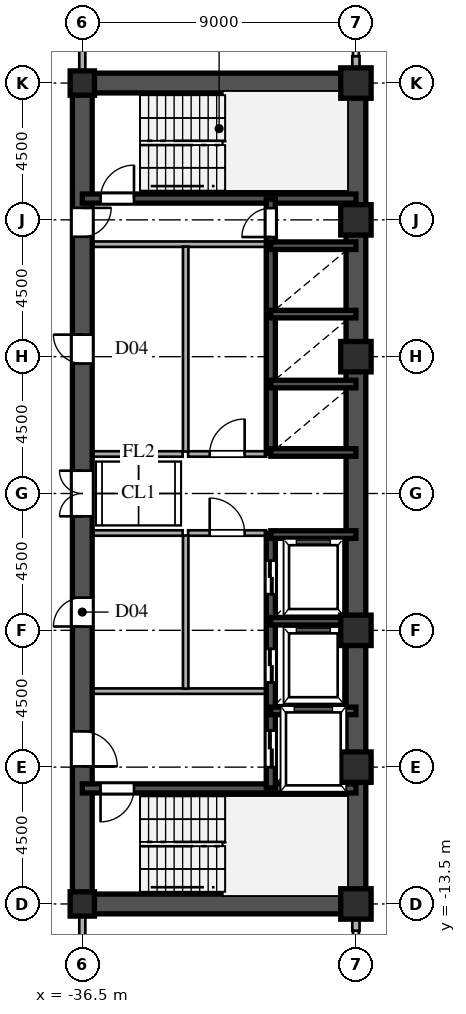
"""IFC4 building model, lengths in metres.
Left out: names, types, materials, properties, quantities, classifications, styles, units other than length and angle.
Written with IfcOpenShell. Run it as: python <this file> out.ifc"""

import sys

from ifc_helpers import new_model, si_unit, direction, frame, frame_2d, origin, origin_2d, place, context, subcontext, project, spatial, rectangle, hollow_rectangle, i_section, extrude, source, transform, mapped, element, fill, save


model = new_model("IFC4")
c1 = context("Model", 3, precision=1e-05, world=origin(), true_north=direction((0.0, 1.0)))
c2 = subcontext(c1, "Body", "Model", "MODEL_VIEW")
j1 = project(units=[si_unit("LENGTHUNIT", "METRE"), si_unit("PLANEANGLEUNIT", "RADIAN")], contexts=[c1])
p1 = place(None, origin())
s1 = spatial("IfcSite", under=j1, at=p1, CompositionType="ELEMENT")
p2 = place(p1, origin())
s2 = spatial("IfcBuilding", under=s1, at=p2, CompositionType="ELEMENT")
p3 = place(p2, frame((0.0, 0.0, 62.1)))
s3 = spatial("IfcBuildingStorey", under=s2, at=p3, CompositionType="ELEMENT", Elevation=62.1)
m1 = source(origin(), c2, "Body", "SweptSolid", [
    extrude(hollow_rectangle(XDim=1.0, YDim=1.0, WallThickness=0.042, at=origin_2d()), origin(), (0.0, 0.0, 1.0), 3.6),
])
for number, where, z_axis, x_axis in (
    (1, (-27.5, -13.5, 0.0), (0.0, 0.0, 1.0), (1.0, 0.0, 0.0)),
    (2, (-27.5, -9.0, 0.0), (0.0, 0.0, 1.0), (1.0, 0.0, 0.0)),
    (3, (-27.5, -4.5, 0.0), (0.0, 0.0, 1.0), (1.0, 0.0, 0.0)),
    (4, (-27.5, 4.5, 0.0), (0.0, 0.0, 1.0), (1.0, 0.0, 0.0)),
    (5, (-27.5, 9.0, 0.0), (0.0, 0.0, 1.0), (1.0, 0.0, 0.0)),
    (6, (-27.5, 13.5, 0.0), (0.0, 0.0, 1.0), (1.0, 0.0, 0.0)),
):
    element("IfcColumn", number, at=place(p3, frame(where, z_axis=z_axis, x_axis=x_axis)), inside=s3, PredefinedType="COLUMN", context=c2, shape_type="MappedRepresentation", body=[
        mapped(m1, transform((0.0, 0.0, 0.0), scale=1.0)),
    ])
m2 = source(origin(), c2, "Body", "SweptSolid", [
    extrude(i_section(OverallWidth=0.8, OverallDepth=0.8, WebThickness=0.032, FlangeThickness=0.05, at=origin_2d()), origin(), (0.0, 0.0, 1.0), 3.6),
])
for number, where, z_axis, x_axis in (
    (7, (-36.5, -13.5, 0.0), (0.0, 0.0, 1.0), (1.0, 0.0, 0.0)),
    (8, (-36.5, 13.5, 0.0), (0.0, 0.0, 1.0), (1.0, 0.0, 0.0)),
):
    element("IfcColumn", number, at=place(p3, frame(where, z_axis=z_axis, x_axis=x_axis)), inside=s3, PredefinedType="COLUMN", context=c2, shape_type="MappedRepresentation", body=[
        mapped(m2, transform((0.0, 0.0, 0.0), scale=1.0)),
    ])
for number, where, z_axis, x_axis in (
    (9, (-27.5, -14.38, 0.0), (0.0, 0.0, 1.0), (0.0, 1.0, 0.0)),
    (10, (-27.5, 13.83, 0.0), (0.0, 0.0, 1.0), (0.0, 1.0, 0.0)),
):
    element("IfcWall", number, at=place(p3, frame(where, z_axis=z_axis, x_axis=x_axis)), inside=s3, PredefinedType="SOLIDWALL", context=c2, shape_type="SweptSolid", body=[
        extrude(rectangle(XDim=0.55, YDim=0.24, at=frame_2d((0.275, 0.0))), origin(), (0.0, 0.0, 1.0), 2.88),
    ])
for number, where, z_axis, x_axis in (
    (11, (-27.5, -13.5, 0.0), (0.0, 0.0, 1.0), (0.0, 1.0, 0.0)),
    (12, (-27.5, 1.3, 0.0), (0.0, 0.0, 1.0), (0.0, 1.0, 0.0)),
):
    element("IfcWall", number, at=place(p3, frame(where, z_axis=z_axis, x_axis=x_axis)), inside=s3, PredefinedType="SHEAR", context=c2, shape_type="SweptSolid", body=[
        extrude(rectangle(XDim=12.2, YDim=0.65, at=frame_2d((6.1, 0.0))), origin(), (0.0, 0.0, 1.0), 3.38),
    ])
p4 = place(p3, frame((-27.5, -1.3, 0.0), z_axis=(0.0, 0.0, 1.0), x_axis=(0.0, 1.0, 0.0)))
e13 = element("IfcWall", 13, at=p4, inside=s3, PredefinedType="SHEAR", context=c2, shape_type="SweptSolid", body=[
    extrude(rectangle(XDim=2.6, YDim=0.65, at=frame_2d((1.3, 0.0))), origin(), (0.0, 0.0, 1.0), 3.38),
])
for number, where, z_axis, x_axis in (
    (14, (-36.5, -13.5, 0.0), (0.0, 0.0, 1.0), (1.0, 0.0, 0.0)),
    (15, (-36.5, 13.5, 0.0), (0.0, 0.0, 1.0), (1.0, 0.0, 0.0)),
):
    element("IfcWall", number, at=place(p3, frame(where, z_axis=z_axis, x_axis=x_axis)), inside=s3, PredefinedType="SHEAR", context=c2, shape_type="SweptSolid", body=[
        extrude(rectangle(XDim=9.0, YDim=0.65, at=frame_2d((4.5, 0.0))), origin(), (0.0, 0.0, 1.0), 3.38),
    ])
p5 = place(p3, frame((-36.5, -13.65, 0.0), z_axis=(0.0, 0.0, 1.0), x_axis=(0.0, 1.0, 0.0)))
e16 = element("IfcWall", 16, at=p5, inside=s3, PredefinedType="SHEAR", context=c2, shape_type="SweptSolid", body=[
    extrude(rectangle(XDim=7.15, YDim=0.65, at=frame_2d((3.575, 0.0))), origin(), (0.0, 0.0, 1.0), 3.38),
])
p6 = place(p5, frame((4.675, 0.0, 0.0)))
e17 = element("IfcOpeningElement", 17, at=p6, cuts=e16, PredefinedType="OPENING", context=c2, shape_type="SweptSolid", body=[
    extrude(rectangle(XDim=1.15, YDim=2.2, at=frame_2d((0.575, 1.1))), frame((0.0, 0.335, 0.0), z_axis=(0.0, -1.0, 0.0), x_axis=(1.0, 0.0, 0.0)), (0.0, 0.0, 1.0), 0.67),
])
p7 = place(p3, frame((-36.5, -1.3, 0.0), z_axis=(0.0, 0.0, 1.0), x_axis=(0.0, 1.0, 0.0)))
e18 = element("IfcWall", 18, at=p7, inside=s3, PredefinedType="SHEAR", context=c2, shape_type="SweptSolid", body=[
    extrude(rectangle(XDim=2.6, YDim=0.65, at=frame_2d((1.3, 0.0))), origin(), (0.0, 0.0, 1.0), 3.38),
])
p8 = place(p7, frame((0.55, 0.0, 0.0)))
e19 = element("IfcOpeningElement", 19, at=p8, cuts=e18, PredefinedType="OPENING", context=c2, shape_type="SweptSolid", body=[
    extrude(rectangle(XDim=1.5, YDim=2.3, at=frame_2d((0.75, 1.15))), frame((0.0, 0.335, 0.0), z_axis=(0.0, -1.0, 0.0), x_axis=(1.0, 0.0, 0.0)), (0.0, 0.0, 1.0), 0.67),
])
p9 = place(p3, frame((-36.5, 8.2, 0.0), z_axis=(0.0, 0.0, 1.0), x_axis=(0.0, 1.0, 0.0)))
e20 = element("IfcWall", 20, at=p9, inside=s3, PredefinedType="SHEAR", context=c2, shape_type="SweptSolid", body=[
    extrude(rectangle(XDim=5.45, YDim=0.65, at=frame_2d((2.725, 0.0))), origin(), (0.0, 0.0, 1.0), 3.38),
])
p10 = place(p9, frame((0.245, 0.0, 0.0)))
e21 = element("IfcOpeningElement", 21, at=p10, cuts=e20, PredefinedType="OPENING", context=c2, shape_type="SweptSolid", body=[
    extrude(rectangle(XDim=0.95, YDim=2.15, at=frame_2d((0.475, 1.075))), frame((0.0, 0.335, 0.0), z_axis=(0.0, -1.0, 0.0), x_axis=(1.0, 0.0, 0.0)), (0.0, 0.0, 1.0), 0.67),
])
p11 = place(p3, frame((-36.5, -6.5, 0.0), z_axis=(0.0, 0.0, 1.0), x_axis=(0.0, 1.0, 0.0)))
e22 = element("IfcWall", 22, at=p11, inside=s3, PredefinedType="SHEAR", context=c2, shape_type="SweptSolid", body=[
    extrude(rectangle(XDim=5.2, YDim=0.65, at=frame_2d((2.6, 0.0))), origin(), (0.0, 0.0, 1.0), 3.38),
])
p12 = place(p11, frame((2.125, 0.0, 0.0)))
e23 = element("IfcOpeningElement", 23, at=p12, cuts=e22, PredefinedType="OPENING", context=c2, shape_type="SweptSolid", body=[
    extrude(rectangle(XDim=0.95, YDim=2.15, at=frame_2d((0.475, 1.075))), frame((0.0, 0.335, 0.0), z_axis=(0.0, -1.0, 0.0), x_axis=(1.0, 0.0, 0.0)), (0.0, 0.0, 1.0), 0.67),
])
p13 = place(p3, frame((-36.5, 1.3, 0.0), z_axis=(0.0, 0.0, 1.0), x_axis=(0.0, 1.0, 0.0)))
e24 = element("IfcWall", 24, at=p13, inside=s3, PredefinedType="SHEAR", context=c2, shape_type="SweptSolid", body=[
    extrude(rectangle(XDim=6.9, YDim=0.65, at=frame_2d((3.45, 0.0))), origin(), (0.0, 0.0, 1.0), 3.38),
])
p14 = place(p13, frame((2.975, 0.0, 0.0)))
e25 = element("IfcOpeningElement", 25, at=p14, cuts=e24, PredefinedType="OPENING", context=c2, shape_type="SweptSolid", body=[
    extrude(rectangle(XDim=0.95, YDim=2.15, at=frame_2d((0.475, 1.075))), frame((0.0, 0.335, 0.0), z_axis=(0.0, -1.0, 0.0), x_axis=(1.0, 0.0, 0.0)), (0.0, 0.0, 1.0), 0.67),
])
p15 = place(p3, frame((-36.5, -9.7, 0.0), z_axis=(0.0, 0.0, 1.0), x_axis=(1.0, 0.0, 0.0)))
e26 = element("IfcWall", 26, at=p15, inside=s3, PredefinedType="SHEAR", context=c2, shape_type="SweptSolid", body=[
    extrude(rectangle(XDim=9.0, YDim=0.3, at=frame_2d((4.5, 0.0))), origin(), (0.0, 0.0, 1.0), 3.38),
])
p16 = place(p15, frame((0.6, 0.0, 0.0)))
e27 = element("IfcOpeningElement", 27, at=p16, cuts=e26, PredefinedType="OPENING", context=c2, shape_type="SweptSolid", body=[
    extrude(rectangle(XDim=1.1, YDim=2.2, at=frame_2d((0.55, 1.1))), frame((0.0, 0.16, 0.0), z_axis=(0.0, -1.0, 0.0), x_axis=(1.0, 0.0, 0.0)), (0.0, 0.0, 1.0), 0.32),
])
p17 = place(p3, frame((-36.5, 9.7, 0.0), z_axis=(0.0, 0.0, 1.0), x_axis=(1.0, 0.0, 0.0)))
e28 = element("IfcWall", 28, at=p17, inside=s3, PredefinedType="SHEAR", context=c2, shape_type="SweptSolid", body=[
    extrude(rectangle(XDim=9.0, YDim=0.3, at=frame_2d((4.5, 0.0))), origin(), (0.0, 0.0, 1.0), 3.38),
])
p18 = place(p17, frame((0.6, 0.0, 0.0)))
e29 = element("IfcOpeningElement", 29, at=p18, cuts=e28, PredefinedType="OPENING", context=c2, shape_type="SweptSolid", body=[
    extrude(rectangle(XDim=1.1, YDim=2.2, at=frame_2d((0.55, 1.1))), frame((0.0, 0.16, 0.0), z_axis=(0.0, -1.0, 0.0), x_axis=(1.0, 0.0, 0.0)), (0.0, 0.0, 1.0), 0.32),
])
for number, where, z_axis, x_axis in (
    (30, (-30.3, -7.15, 0.0), (0.0, 0.0, 1.0), (1.0, 0.0, 0.0)),
    (31, (-30.3, -4.2, 0.0), (0.0, 0.0, 1.0), (1.0, 0.0, 0.0)),
    (32, (-30.3, -1.35, 0.0), (0.0, 0.0, 1.0), (1.0, 0.0, 0.0)),
    (33, (-30.3, 1.35, 0.0), (0.0, 0.0, 1.0), (1.0, 0.0, 0.0)),
    (34, (-30.3, 3.6, 0.0), (0.0, 0.0, 1.0), (1.0, 0.0, 0.0)),
    (35, (-30.3, 5.9, 0.0), (0.0, 0.0, 1.0), (1.0, 0.0, 0.0)),
    (36, (-30.3, 8.15, 0.0), (0.0, 0.0, 1.0), (1.0, 0.0, 0.0)),
):
    element("IfcWall", number, at=place(p3, frame(where, z_axis=z_axis, x_axis=x_axis)), inside=s3, PredefinedType="SHEAR", context=c2, shape_type="SweptSolid", body=[
        extrude(rectangle(XDim=2.8, YDim=0.25, at=frame_2d((1.4, 0.0))), origin(), (0.0, 0.0, 1.0), 3.38),
    ])
p19 = place(p3, frame((-30.3, -9.68, 0.0), z_axis=(0.0, 0.0, 1.0), x_axis=(0.0, 1.0, 0.0)))
e37 = element("IfcWall", 37, at=p19, inside=s3, PredefinedType="SHEAR", context=c2, shape_type="SweptSolid", body=[
    extrude(rectangle(XDim=2.56, YDim=0.3, at=frame_2d((1.28, 0.0))), origin(), (0.0, 0.0, 1.0), 3.38),
])
p20 = place(p19, frame((0.68, 0.0, 0.0)))
e38 = element("IfcOpeningElement", 38, at=p20, cuts=e37, PredefinedType="OPENING", context=c2, shape_type="SweptSolid", body=[
    extrude(rectangle(XDim=1.2, YDim=2.25, at=frame_2d((0.6, 1.125))), frame((0.0, 0.16, 0.0), z_axis=(0.0, -1.0, 0.0), x_axis=(1.0, 0.0, 0.0)), (0.0, 0.0, 1.0), 0.32),
])
p21 = place(p3, frame((-30.3, -7.12, 0.0), z_axis=(0.0, 0.0, 1.0), x_axis=(0.0, 1.0, 0.0)))
e39 = element("IfcWall", 39, at=p21, inside=s3, PredefinedType="SHEAR", context=c2, shape_type="SweptSolid", body=[
    extrude(rectangle(XDim=2.92, YDim=0.3, at=frame_2d((1.46, 0.0))), origin(), (0.0, 0.0, 1.0), 3.38),
])
p22 = place(p21, frame((0.91, 0.0, 0.0)))
e40 = element("IfcOpeningElement", 40, at=p22, cuts=e39, PredefinedType="OPENING", context=c2, shape_type="SweptSolid", body=[
    extrude(rectangle(XDim=1.1, YDim=2.2, at=frame_2d((0.55, 1.1))), frame((0.0, 0.16, 0.0), z_axis=(0.0, -1.0, 0.0), x_axis=(1.0, 0.0, 0.0)), (0.0, 0.0, 1.0), 0.32),
])
p23 = place(p3, frame((-30.3, -4.2, 0.0), z_axis=(0.0, 0.0, 1.0), x_axis=(0.0, 1.0, 0.0)))
e41 = element("IfcWall", 41, at=p23, inside=s3, PredefinedType="SHEAR", context=c2, shape_type="SweptSolid", body=[
    extrude(rectangle(XDim=2.88, YDim=0.3, at=frame_2d((1.44, 0.0))), origin(), (0.0, 0.0, 1.0), 3.38),
])
p24 = place(p23, frame((0.89, 0.0, 0.0)))
e42 = element("IfcOpeningElement", 42, at=p24, cuts=e41, PredefinedType="OPENING", context=c2, shape_type="SweptSolid", body=[
    extrude(rectangle(XDim=1.1, YDim=2.2, at=frame_2d((0.55, 1.1))), frame((0.0, 0.16, 0.0), z_axis=(0.0, -1.0, 0.0), x_axis=(1.0, 0.0, 0.0)), (0.0, 0.0, 1.0), 0.32),
])
p25 = place(p3, frame((-30.3, 1.32, 0.0), z_axis=(0.0, 0.0, 1.0), x_axis=(0.0, 1.0, 0.0)))
e43 = element("IfcWall", 43, at=p25, inside=s3, PredefinedType="SHEAR", context=c2, shape_type="SweptSolid", body=[
    extrude(rectangle(XDim=2.28, YDim=0.3, at=frame_2d((1.14, 0.0))), origin(), (0.0, 0.0, 1.0), 3.38),
])
p26 = place(p3, frame((-30.3, 3.6, 0.0), z_axis=(0.0, 0.0, 1.0), x_axis=(0.0, 1.0, 0.0)))
e44 = element("IfcWall", 44, at=p26, inside=s3, PredefinedType="SHEAR", context=c2, shape_type="SweptSolid", body=[
    extrude(rectangle(XDim=2.3, YDim=0.3, at=frame_2d((1.15, 0.0))), origin(), (0.0, 0.0, 1.0), 3.38),
])
p27 = place(p3, frame((-30.3, 5.9, 0.0), z_axis=(0.0, 0.0, 1.0), x_axis=(0.0, 1.0, 0.0)))
e45 = element("IfcWall", 45, at=p27, inside=s3, PredefinedType="SHEAR", context=c2, shape_type="SweptSolid", body=[
    extrude(rectangle(XDim=2.25, YDim=0.3, at=frame_2d((1.125, 0.0))), origin(), (0.0, 0.0, 1.0), 3.38),
])
p28 = place(p3, frame((-30.3, 8.15, 0.0), z_axis=(0.0, 0.0, 1.0), x_axis=(0.0, 1.0, 0.0)))
e46 = element("IfcWall", 46, at=p28, inside=s3, PredefinedType="SHEAR", context=c2, shape_type="SweptSolid", body=[
    extrude(rectangle(XDim=1.53, YDim=0.3, at=frame_2d((0.765, 0.0))), origin(), (0.0, 0.0, 1.0), 3.38),
])
p29 = place(p28, frame((0.285, 0.0, 0.0)))
e47 = element("IfcOpeningElement", 47, at=p29, cuts=e46, PredefinedType="OPENING", context=c2, shape_type="SweptSolid", body=[
    extrude(rectangle(XDim=0.95, YDim=2.15, at=frame_2d((0.475, 1.075))), frame((0.0, 0.16, 0.0), z_axis=(0.0, -1.0, 0.0), x_axis=(1.0, 0.0, 0.0)), (0.0, 0.0, 1.0), 0.32),
])
for number, where, z_axis, x_axis in (
    (48, (-36.15, -6.5, 0.0), (0.0, 0.0, 1.0), (1.0, 0.0, 0.0)),
    (49, (-36.15, 8.2, 0.0), (0.0, 0.0, 1.0), (1.0, 0.0, 0.0)),
):
    element("IfcWall", number, at=place(p3, frame(where, z_axis=z_axis, x_axis=x_axis)), inside=s3, PredefinedType="PARTITIONING", context=c2, shape_type="SweptSolid", body=[
        extrude(rectangle(XDim=5.7, YDim=0.18, at=frame_2d((2.85, 0.0))), origin(), (0.0, 0.0, 1.0), 3.38),
    ])
p30 = place(p3, frame((-33.1, -6.42, 0.0), z_axis=(0.0, 0.0, 1.0), x_axis=(0.0, 1.0, 0.0)))
e50 = element("IfcWall", 50, at=p30, inside=s3, PredefinedType="PARTITIONING", context=c2, shape_type="SweptSolid", body=[
    extrude(rectangle(XDim=5.04, YDim=0.18, at=frame_2d((2.52, 0.0))), origin(), (0.0, 0.0, 1.0), 3.38),
])
p31 = place(p3, frame((-33.1, 1.38, 0.0), z_axis=(0.0, 0.0, 1.0), x_axis=(0.0, 1.0, 0.0)))
e51 = element("IfcWall", 51, at=p31, inside=s3, PredefinedType="PARTITIONING", context=c2, shape_type="SweptSolid", body=[
    extrude(rectangle(XDim=6.74, YDim=0.18, at=frame_2d((3.37, 0.0))), origin(), (0.0, 0.0, 1.0), 3.38),
])
p32 = place(p3, frame((-33.02, -1.3, 0.0), z_axis=(0.0, 0.0, 1.0), x_axis=(1.0, 0.0, 0.0)))
e52 = element("IfcWall", 52, at=p32, inside=s3, PredefinedType="PARTITIONING", context=c2, shape_type="SweptSolid", body=[
    extrude(rectangle(XDim=2.57, YDim=0.18, at=frame_2d((1.285, 0.0))), origin(), (0.0, 0.0, 1.0), 3.38),
])
p33 = place(p32, frame((0.71, 0.0, 0.0)))
e53 = element("IfcOpeningElement", 53, at=p33, cuts=e52, PredefinedType="OPENING", context=c2, shape_type="SweptSolid", body=[
    extrude(rectangle(XDim=1.15, YDim=2.2, at=frame_2d((0.575, 1.1))), frame((0.0, 0.1, 0.0), z_axis=(0.0, -1.0, 0.0), x_axis=(1.0, 0.0, 0.0)), (0.0, 0.0, 1.0), 0.2),
])
p34 = place(p3, frame((-33.02, 1.3, 0.0), z_axis=(0.0, 0.0, 1.0), x_axis=(1.0, 0.0, 0.0)))
e54 = element("IfcWall", 54, at=p34, inside=s3, PredefinedType="PARTITIONING", context=c2, shape_type="SweptSolid", body=[
    extrude(rectangle(XDim=2.57, YDim=0.18, at=frame_2d((1.285, 0.0))), origin(), (0.0, 0.0, 1.0), 3.38),
])
p35 = place(p34, frame((0.71, 0.0, 0.0)))
e55 = element("IfcOpeningElement", 55, at=p35, cuts=e54, PredefinedType="OPENING", context=c2, shape_type="SweptSolid", body=[
    extrude(rectangle(XDim=1.15, YDim=2.2, at=frame_2d((0.575, 1.1))), frame((0.0, 0.1, 0.0), z_axis=(0.0, -1.0, 0.0), x_axis=(1.0, 0.0, 0.0)), (0.0, 0.0, 1.0), 0.2),
])
for number, where, z_axis, x_axis in (
    (56, (-36.15, -1.3, 0.0), (0.0, 0.0, 1.0), (1.0, 0.0, 0.0)),
    (57, (-36.15, 1.3, 0.0), (0.0, 0.0, 1.0), (1.0, 0.0, 0.0)),
):
    element("IfcWall", number, at=place(p3, frame(where, z_axis=z_axis, x_axis=x_axis)), inside=s3, PredefinedType="PARTITIONING", context=c2, shape_type="SweptSolid", body=[
        extrude(rectangle(XDim=2.95, YDim=0.18, at=frame_2d((1.475, 0.0))), origin(), (0.0, 0.0, 1.0), 3.38),
    ])
for number, where, z_axis, x_axis in (
    (58, (-36.5, -15.515, 0.0), (0.0, 0.0, 1.0), (0.0, 1.0, 0.0)),
    (59, (-36.5, 13.83, 0.0), (0.0, 0.0, 1.0), (0.0, 1.0, 0.0)),
):
    element("IfcWall", number, at=place(p3, frame(where, z_axis=z_axis, x_axis=x_axis)), inside=s3, PredefinedType="PARTITIONING", context=c2, shape_type="SweptSolid", body=[
        extrude(rectangle(XDim=1.685, YDim=0.2, at=frame_2d((0.842, 0.0))), origin(), (0.0, 0.0, 1.0), 2.68),
    ])
m3 = source(origin(), c2, "Body", "SweptSolid", [
    extrude(rectangle(XDim=1.15, YDim=2.2, at=frame_2d((0.575, 1.1))), frame((0.0, 0.025, 0.0), z_axis=(0.0, -1.0, 0.0), x_axis=(1.0, 0.0, 0.0)), (0.0, 0.0, 1.0), 0.05),
])
p36 = place(p6, frame((1.15, 0.0, 0.0), z_axis=(0.0, 0.0, 1.0), x_axis=(-1.0, 0.0, 0.0)))
e60 = element("IfcDoor", 60, at=p36, inside=s3, OperationType="SINGLE_SWING_LEFT", PredefinedType="DOOR", context=c2, shape_type="MappedRepresentation", body=[
    mapped(m3, transform((0.0, 0.0, 0.0), scale=1.0)),
])
fill(e17, e60)
m4 = source(origin(), c2, "Body", "SweptSolid", [
    extrude(rectangle(XDim=1.5, YDim=2.3, at=frame_2d((0.75, 1.15))), frame((0.0, 0.025, 0.0), z_axis=(0.0, -1.0, 0.0), x_axis=(1.0, 0.0, 0.0)), (0.0, 0.0, 1.0), 0.05),
])
p37 = place(p8, origin())
e61 = element("IfcDoor", 61, at=p37, inside=s3, OperationType="DOUBLE_SWING_LEFT", PredefinedType="DOOR", context=c2, shape_type="MappedRepresentation", body=[
    mapped(m4, transform((0.0, 0.0, 0.0), scale=1.0)),
])
fill(e19, e61)
m5 = source(origin(), c2, "Body", "SweptSolid", [
    extrude(rectangle(XDim=0.95, YDim=2.15, at=frame_2d((0.475, 1.075))), frame((0.0, 0.025, 0.0), z_axis=(0.0, -1.0, 0.0), x_axis=(1.0, 0.0, 0.0)), (0.0, 0.0, 1.0), 0.05),
])
p38 = place(p10, frame((0.95, 0.0, 0.0), z_axis=(0.0, 0.0, 1.0), x_axis=(-1.0, 0.0, 0.0)))
e62 = element("IfcDoor", 62, at=p38, inside=s3, OperationType="SINGLE_SWING_RIGHT", PredefinedType="DOOR", context=c2, shape_type="MappedRepresentation", body=[
    mapped(m5, transform((0.0, 0.0, 0.0), scale=1.0)),
])
fill(e21, e62)
p39 = place(p12, origin())
e63 = element("IfcDoor", 63, at=p39, inside=s3, OperationType="SINGLE_SWING_LEFT", PredefinedType="DOOR", context=c2, shape_type="MappedRepresentation", body=[
    mapped(m5, transform((0.0, 0.0, 0.0), scale=1.0)),
])
fill(e23, e63)
p40 = place(p14, origin())
e64 = element("IfcDoor", 64, at=p40, inside=s3, OperationType="SINGLE_SWING_RIGHT", PredefinedType="DOOR", context=c2, shape_type="MappedRepresentation", body=[
    mapped(m5, transform((0.0, 0.0, 0.0), scale=1.0)),
])
fill(e25, e64)
m6 = source(origin(), c2, "Body", "SweptSolid", [
    extrude(rectangle(XDim=1.1, YDim=2.2, at=frame_2d((0.55, 1.1))), frame((0.0, 0.025, 0.0), z_axis=(0.0, -1.0, 0.0), x_axis=(1.0, 0.0, 0.0)), (0.0, 0.0, 1.0), 0.05),
])
p41 = place(p16, frame((1.1, 0.0, 0.0), z_axis=(0.0, 0.0, 1.0), x_axis=(-1.0, 0.0, 0.0)))
e65 = element("IfcDoor", 65, at=p41, inside=s3, OperationType="SINGLE_SWING_LEFT", PredefinedType="DOOR", context=c2, shape_type="MappedRepresentation", body=[
    mapped(m6, transform((0.0, 0.0, 0.0), scale=1.0)),
])
fill(e27, e65)
p42 = place(p18, origin())
e66 = element("IfcDoor", 66, at=p42, inside=s3, OperationType="SINGLE_SWING_RIGHT", PredefinedType="DOOR", context=c2, shape_type="MappedRepresentation", body=[
    mapped(m6, transform((0.0, 0.0, 0.0), scale=1.0)),
])
fill(e29, e66)
m7 = source(origin(), c2, "Body", "SweptSolid", [
    extrude(rectangle(XDim=1.2, YDim=2.25, at=frame_2d((0.6, 1.125))), frame((0.0, 0.025, 0.0), z_axis=(0.0, -1.0, 0.0), x_axis=(1.0, 0.0, 0.0)), (0.0, 0.0, 1.0), 0.05),
])
p43 = place(p20, origin())
e67 = element("IfcDoor", 67, at=p43, inside=s3, OperationType="DOUBLE_DOOR_SLIDING", PredefinedType="DOOR", context=c2, shape_type="MappedRepresentation", body=[
    mapped(m7, transform((0.0, 0.0, 0.0), scale=1.0)),
])
fill(e38, e67)
m8 = source(origin(), c2, "Body", "SweptSolid", [
    extrude(rectangle(XDim=1.1, YDim=2.2, at=frame_2d((0.55, 1.1))), frame((0.0, 0.025, 0.0), z_axis=(0.0, -1.0, 0.0), x_axis=(1.0, 0.0, 0.0)), (0.0, 0.0, 1.0), 0.05),
])
p44 = place(p22, origin())
e68 = element("IfcDoor", 68, at=p44, inside=s3, OperationType="DOUBLE_DOOR_SLIDING", PredefinedType="DOOR", context=c2, shape_type="MappedRepresentation", body=[
    mapped(m8, transform((0.0, 0.0, 0.0), scale=1.0)),
])
fill(e40, e68)
p45 = place(p24, origin())
e69 = element("IfcDoor", 69, at=p45, inside=s3, OperationType="DOUBLE_DOOR_SLIDING", PredefinedType="DOOR", context=c2, shape_type="MappedRepresentation", body=[
    mapped(m8, transform((0.0, 0.0, 0.0), scale=1.0)),
])
fill(e42, e69)
p46 = place(p29, origin())
e70 = element("IfcDoor", 70, at=p46, inside=s3, OperationType="SINGLE_SWING_LEFT", PredefinedType="DOOR", context=c2, shape_type="MappedRepresentation", body=[
    mapped(m5, transform((0.0, 0.0, 0.0), scale=1.0)),
])
fill(e47, e70)
p47 = place(p33, origin())
e71 = element("IfcDoor", 71, at=p47, inside=s3, OperationType="SINGLE_SWING_LEFT", PredefinedType="DOOR", context=c2, shape_type="MappedRepresentation", body=[
    mapped(m3, transform((0.0, 0.0, 0.0), scale=1.0)),
])
fill(e53, e71)
p48 = place(p35, origin())
e72 = element("IfcDoor", 72, at=p48, inside=s3, OperationType="SINGLE_SWING_RIGHT", PredefinedType="DOOR", context=c2, shape_type="MappedRepresentation", body=[
    mapped(m3, transform((0.0, 0.0, 0.0), scale=1.0)),
])
fill(e55, e72)
save(model, sys.argv[1])
